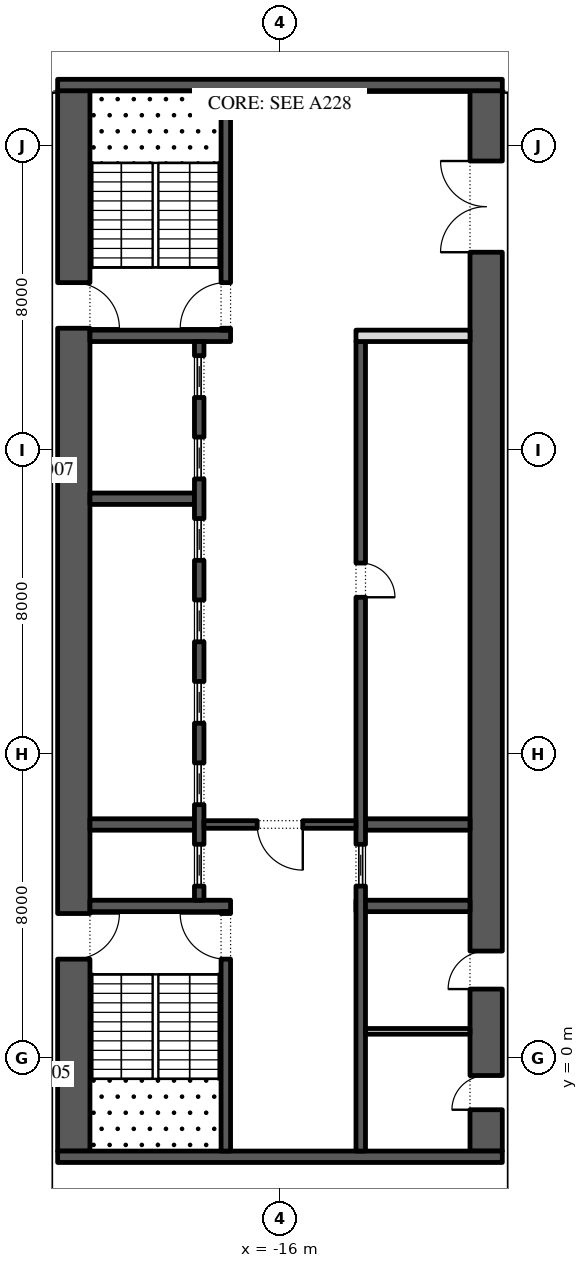
"""IFC4 building model, lengths in metres.
Left out: names, types, materials, properties, quantities, classifications, styles, units other than length and angle.
Written with IfcOpenShell. Run it as: python <this file> out.ifc"""

import sys

from ifc_helpers import new_model, si_unit, direction, frame, frame_2d, origin, place, context, subcontext, project, spatial, rectangle, extrude, element, fill, save


model = new_model("IFC4")
c1 = context("Model", 3, precision=1e-05, world=origin(), true_north=direction((0.0, 1.0)))
c2 = subcontext(c1, "Body", "Model", "MODEL_VIEW")
j1 = project(units=[si_unit("LENGTHUNIT", "METRE"), si_unit("PLANEANGLEUNIT", "RADIAN")], contexts=[c1])
p1 = place(None, origin())
s1 = spatial("IfcSite", under=j1, at=p1, CompositionType="ELEMENT")
p2 = place(p1, origin())
s2 = spatial("IfcBuilding", under=s1, at=p2, CompositionType="ELEMENT")
p3 = place(p2, frame((0.0, 0.0, 118.2)))
s3 = spatial("IfcBuildingStorey", under=s2, at=p3, CompositionType="ELEMENT", Elevation=118.2)
p4 = place(p3, frame((-21.425, -2.45, 0.0), z_axis=(0.0, 0.0, 1.0), x_axis=(0.0, 1.0, 0.0)))
e1 = element("IfcWall", 1, at=p4, inside=s3, PredefinedType="SHEAR", context=c2, shape_type="SweptSolid", body=[
    extrude(rectangle(XDim=27.9, YDim=0.85, at=frame_2d((13.95, 0.0))), origin(), (0.0, 0.0, 1.0), 4.0),
])
p5 = place(p4, frame((5.05, 0.0, 0.0)))
e2 = element("IfcOpeningElement", 2, at=p5, cuts=e1, PredefinedType="OPENING", context=c2, shape_type="SweptSolid", body=[
    extrude(rectangle(XDim=1.2, YDim=2.1, at=frame_2d((0.6, 1.05))), frame((0.0, 0.435, 0.0), z_axis=(0.0, -1.0, 0.0), x_axis=(1.0, 0.0, 0.0)), (0.0, 0.0, 1.0), 0.87),
])
p6 = place(p4, frame((21.65, 0.0, 0.0)))
e3 = element("IfcOpeningElement", 3, at=p6, cuts=e1, PredefinedType="OPENING", context=c2, shape_type="SweptSolid", body=[
    extrude(rectangle(XDim=1.2, YDim=2.1, at=frame_2d((0.6, 1.05))), frame((0.0, 0.435, 0.0), z_axis=(0.0, -1.0, 0.0), x_axis=(1.0, 0.0, 0.0)), (0.0, 0.0, 1.0), 0.87),
])
p7 = place(p3, frame((-10.575, -2.45, 0.0), z_axis=(0.0, 0.0, 1.0), x_axis=(0.0, 1.0, 0.0)))
e4 = element("IfcWall", 4, at=p7, inside=s3, PredefinedType="SHEAR", context=c2, shape_type="SweptSolid", body=[
    extrude(rectangle(XDim=27.9, YDim=0.85, at=frame_2d((13.95, 0.0))), origin(), (0.0, 0.0, 1.0), 4.0),
])
p8 = place(p7, frame((23.65, 0.0, 0.0)))
e5 = element("IfcOpeningElement", 5, at=p8, cuts=e4, PredefinedType="OPENING", context=c2, shape_type="SweptSolid", body=[
    extrude(rectangle(XDim=2.4, YDim=2.1, at=frame_2d((1.2, 1.05))), frame((0.0, 0.435, 0.0), z_axis=(0.0, -1.0, 0.0), x_axis=(1.0, 0.0, 0.0)), (0.0, 0.0, 1.0), 0.87),
])
p9 = place(p7, frame((1.087, 0.0, 0.0)))
e6 = element("IfcOpeningElement", 6, at=p9, cuts=e4, PredefinedType="OPENING", context=c2, shape_type="SweptSolid", body=[
    extrude(rectangle(XDim=0.9, YDim=2.1, at=frame_2d((0.45, 1.05))), frame((0.0, 0.435, 0.0), z_axis=(0.0, -1.0, 0.0), x_axis=(1.0, 0.0, 0.0)), (0.0, 0.0, 1.0), 0.87),
])
p10 = place(p7, frame((4.262, 0.0, 0.0)))
e7 = element("IfcOpeningElement", 7, at=p10, cuts=e4, PredefinedType="OPENING", context=c2, shape_type="SweptSolid", body=[
    extrude(rectangle(XDim=1.0, YDim=2.1, at=frame_2d((0.5, 1.05))), frame((0.0, 0.435, 0.0), z_axis=(0.0, -1.0, 0.0), x_axis=(1.0, 0.0, 0.0)), (0.0, 0.0, 1.0), 0.87),
])
for number, where, z_axis, x_axis in (
    (8, (-21.85, -2.6, 0.0), (0.0, 0.0, 1.0), (1.0, 0.0, 0.0)),
    (9, (-21.85, 25.6, 0.0), (0.0, 0.0, 1.0), (1.0, 0.0, 0.0)),
):
    element("IfcWall", number, at=place(p3, frame(where, z_axis=z_axis, x_axis=x_axis)), inside=s3, PredefinedType="SHEAR", context=c2, shape_type="SweptSolid", body=[
        extrude(rectangle(XDim=11.7, YDim=0.3, at=frame_2d((5.85, 0.0))), origin(), (0.0, 0.0, 1.0), 4.0),
    ])
p11 = place(p3, frame((-21.0, 4.0, 0.0), z_axis=(0.0, 0.0, 1.0), x_axis=(1.0, 0.0, 0.0)))
e10 = element("IfcWall", 10, at=p11, inside=s3, PredefinedType="SHEAR", context=c2, shape_type="SweptSolid", body=[
    extrude(rectangle(XDim=3.7, YDim=0.3, at=frame_2d((1.85, 0.0))), origin(), (0.0, 0.0, 1.0), 4.0),
])
p12 = place(p3, frame((-17.425, -2.45, 0.0), z_axis=(0.0, 0.0, 1.0), x_axis=(0.0, 1.0, 0.0)))
e11 = element("IfcWall", 11, at=p12, inside=s3, PredefinedType="SHEAR", context=c2, shape_type="SweptSolid", body=[
    extrude(rectangle(XDim=6.3, YDim=0.25, at=frame_2d((3.15, 0.0))), origin(), (0.0, 0.0, 1.0), 4.0),
])
p13 = place(p12, frame((5.05, 0.0, 0.0)))
e12 = element("IfcOpeningElement", 12, at=p13, cuts=e11, PredefinedType="OPENING", context=c2, shape_type="SweptSolid", body=[
    extrude(rectangle(XDim=1.2, YDim=2.1, at=frame_2d((0.6, 1.05))), frame((0.0, 0.135, 0.0), z_axis=(0.0, -1.0, 0.0), x_axis=(1.0, 0.0, 0.0)), (0.0, 0.0, 1.0), 0.27),
])
p14 = place(p3, frame((-21.0, 19.0, 0.0), z_axis=(0.0, 0.0, 1.0), x_axis=(1.0, 0.0, 0.0)))
e13 = element("IfcWall", 13, at=p14, inside=s3, PredefinedType="SHEAR", context=c2, shape_type="SweptSolid", body=[
    extrude(rectangle(XDim=3.7, YDim=0.3, at=frame_2d((1.85, 0.0))), origin(), (0.0, 0.0, 1.0), 4.0),
])
p15 = place(p3, frame((-17.425, 19.15, 0.0), z_axis=(0.0, 0.0, 1.0), x_axis=(0.0, 1.0, 0.0)))
e14 = element("IfcWall", 14, at=p15, inside=s3, PredefinedType="SHEAR", context=c2, shape_type="SweptSolid", body=[
    extrude(rectangle(XDim=6.3, YDim=0.25, at=frame_2d((3.15, 0.0))), origin(), (0.0, 0.0, 1.0), 4.0),
])
p16 = place(p15, frame((0.05, 0.0, 0.0)))
e15 = element("IfcOpeningElement", 15, at=p16, cuts=e14, PredefinedType="OPENING", context=c2, shape_type="SweptSolid", body=[
    extrude(rectangle(XDim=1.2, YDim=2.1, at=frame_2d((0.6, 1.05))), frame((0.0, 0.135, 0.0), z_axis=(0.0, -1.0, 0.0), x_axis=(1.0, 0.0, 0.0)), (0.0, 0.0, 1.0), 0.27),
])
for number, where, z_axis, x_axis in (
    (16, (-21.0, 6.143, 0.0), (0.0, 0.0, 1.0), (1.0, 0.0, 0.0)),
    (17, (-21.0, 14.714, 0.0), (0.0, 0.0, 1.0), (1.0, 0.0, 0.0)),
):
    element("IfcWall", number, at=place(p3, frame(where, z_axis=z_axis, x_axis=x_axis)), inside=s3, PredefinedType="SHEAR", context=c2, shape_type="SweptSolid", body=[
        extrude(rectangle(XDim=2.75, YDim=0.3, at=frame_2d((1.375, 0.0))), origin(), (0.0, 0.0, 1.0), 4.0),
    ])
p17 = place(p3, frame((-18.125, 4.15, 0.0), z_axis=(0.0, 0.0, 1.0), x_axis=(0.0, 1.0, 0.0)))
e18 = element("IfcWall", 18, at=p17, inside=s3, PredefinedType="SHEAR", context=c2, shape_type="SweptSolid", body=[
    extrude(rectangle(XDim=14.7, YDim=0.25, at=frame_2d((7.35, 0.0))), origin(), (0.0, 0.0, 1.0), 4.0),
])
p18 = place(p17, frame((0.371, 0.0, 0.0)))
e19 = element("IfcOpeningElement", 19, at=p18, cuts=e18, PredefinedType="OPENING", context=c2, shape_type="SweptSolid", body=[
    extrude(rectangle(XDim=1.1, YDim=2.1, at=frame_2d((0.55, 1.05))), frame((0.0, 0.135, 0.0), z_axis=(0.0, -1.0, 0.0), x_axis=(1.0, 0.0, 0.0)), (0.0, 0.0, 1.0), 0.27),
])
p19 = place(p17, frame((2.514, 0.0, 0.0)))
e20 = element("IfcOpeningElement", 20, at=p19, cuts=e18, PredefinedType="OPENING", context=c2, shape_type="SweptSolid", body=[
    extrude(rectangle(XDim=1.1, YDim=2.1, at=frame_2d((0.55, 1.05))), frame((0.0, 0.135, 0.0), z_axis=(0.0, -1.0, 0.0), x_axis=(1.0, 0.0, 0.0)), (0.0, 0.0, 1.0), 0.27),
])
p20 = place(p17, frame((4.657, 0.0, 0.0)))
e21 = element("IfcOpeningElement", 21, at=p20, cuts=e18, PredefinedType="OPENING", context=c2, shape_type="SweptSolid", body=[
    extrude(rectangle(XDim=1.1, YDim=2.1, at=frame_2d((0.55, 1.05))), frame((0.0, 0.135, 0.0), z_axis=(0.0, -1.0, 0.0), x_axis=(1.0, 0.0, 0.0)), (0.0, 0.0, 1.0), 0.27),
])
p21 = place(p17, frame((6.8, 0.0, 0.0)))
e22 = element("IfcOpeningElement", 22, at=p21, cuts=e18, PredefinedType="OPENING", context=c2, shape_type="SweptSolid", body=[
    extrude(rectangle(XDim=1.1, YDim=2.1, at=frame_2d((0.55, 1.05))), frame((0.0, 0.135, 0.0), z_axis=(0.0, -1.0, 0.0), x_axis=(1.0, 0.0, 0.0)), (0.0, 0.0, 1.0), 0.27),
])
p22 = place(p17, frame((8.943, 0.0, 0.0)))
e23 = element("IfcOpeningElement", 23, at=p22, cuts=e18, PredefinedType="OPENING", context=c2, shape_type="SweptSolid", body=[
    extrude(rectangle(XDim=1.1, YDim=2.1, at=frame_2d((0.55, 1.05))), frame((0.0, 0.135, 0.0), z_axis=(0.0, -1.0, 0.0), x_axis=(1.0, 0.0, 0.0)), (0.0, 0.0, 1.0), 0.27),
])
p23 = place(p17, frame((11.086, 0.0, 0.0)))
e24 = element("IfcOpeningElement", 24, at=p23, cuts=e18, PredefinedType="OPENING", context=c2, shape_type="SweptSolid", body=[
    extrude(rectangle(XDim=1.1, YDim=2.1, at=frame_2d((0.55, 1.05))), frame((0.0, 0.135, 0.0), z_axis=(0.0, -1.0, 0.0), x_axis=(1.0, 0.0, 0.0)), (0.0, 0.0, 1.0), 0.27),
])
p24 = place(p17, frame((13.229, 0.0, 0.0)))
e25 = element("IfcOpeningElement", 25, at=p24, cuts=e18, PredefinedType="OPENING", context=c2, shape_type="SweptSolid", body=[
    extrude(rectangle(XDim=1.1, YDim=2.1, at=frame_2d((0.55, 1.05))), frame((0.0, 0.135, 0.0), z_axis=(0.0, -1.0, 0.0), x_axis=(1.0, 0.0, 0.0)), (0.0, 0.0, 1.0), 0.27),
])
p25 = place(p3, frame((-14.0, 4.0, 0.0), z_axis=(0.0, 0.0, 1.0), x_axis=(1.0, 0.0, 0.0)))
e26 = element("IfcWall", 26, at=p25, inside=s3, PredefinedType="SHEAR", context=c2, shape_type="SweptSolid", body=[
    extrude(rectangle(XDim=3.0, YDim=0.3, at=frame_2d((1.5, 0.0))), origin(), (0.0, 0.0, 1.0), 4.0),
])
p26 = place(p3, frame((-13.75, 6.143, 0.0), z_axis=(0.0, 0.0, 1.0), x_axis=(1.0, 0.0, 0.0)))
e27 = element("IfcWall", 27, at=p26, inside=s3, PredefinedType="SHEAR", context=c2, shape_type="SweptSolid", body=[
    extrude(rectangle(XDim=2.75, YDim=0.3, at=frame_2d((1.375, 0.0))), origin(), (0.0, 0.0, 1.0), 4.0),
])
p27 = place(p3, frame((-13.875, -2.45, 0.0), z_axis=(0.0, 0.0, 1.0), x_axis=(0.0, 1.0, 0.0)))
e28 = element("IfcWall", 28, at=p27, inside=s3, PredefinedType="SHEAR", context=c2, shape_type="SweptSolid", body=[
    extrude(rectangle(XDim=21.3, YDim=0.25, at=frame_2d((10.65, 0.0))), origin(), (0.0, 0.0, 1.0), 4.0),
])
p28 = place(p27, frame((14.571, 0.0, 0.0)))
e29 = element("IfcOpeningElement", 29, at=p28, cuts=e28, PredefinedType="OPENING", context=c2, shape_type="SweptSolid", body=[
    extrude(rectangle(XDim=0.9, YDim=2.1, at=frame_2d((0.45, 1.05))), frame((0.0, 0.135, 0.0), z_axis=(0.0, -1.0, 0.0), x_axis=(1.0, 0.0, 0.0)), (0.0, 0.0, 1.0), 0.27),
])
p29 = place(p27, frame((6.971, 0.0, 0.0)))
e30 = element("IfcOpeningElement", 30, at=p29, cuts=e28, PredefinedType="OPENING", context=c2, shape_type="SweptSolid", body=[
    extrude(rectangle(XDim=1.1, YDim=2.1, at=frame_2d((0.55, 1.05))), frame((0.0, 0.135, 0.0), z_axis=(0.0, -1.0, 0.0), x_axis=(1.0, 0.0, 0.0)), (0.0, 0.0, 1.0), 0.27),
])
p30 = place(p3, frame((-14.0, 19.0, 0.0), z_axis=(0.0, 0.0, 1.0), x_axis=(1.0, 0.0, 0.0)))
e31 = element("IfcWall", 31, at=p30, inside=s3, PredefinedType="PARTITIONING", context=c2, shape_type="SweptSolid", body=[
    extrude(rectangle(XDim=3.0, YDim=0.3, at=frame_2d((1.5, 0.0))), origin(), (0.0, 0.0, 1.0), 4.0),
])
p31 = place(p3, frame((-18.0, 6.143, 0.0), z_axis=(0.0, 0.0, 1.0), x_axis=(1.0, 0.0, 0.0)))
e32 = element("IfcWall", 32, at=p31, inside=s3, PredefinedType="SHEAR", context=c2, shape_type="SweptSolid", body=[
    extrude(rectangle(XDim=4.0, YDim=0.2, at=frame_2d((2.0, 0.0))), origin(), (0.0, 0.0, 1.0), 4.0),
])
p32 = place(p31, frame((1.4, 0.0, 0.0)))
e33 = element("IfcOpeningElement", 33, at=p32, cuts=e32, PredefinedType="OPENING", context=c2, shape_type="SweptSolid", body=[
    extrude(rectangle(XDim=1.2, YDim=2.1, at=frame_2d((0.6, 1.05))), frame((0.0, 0.11, 0.0), z_axis=(0.0, -1.0, 0.0), x_axis=(1.0, 0.0, 0.0)), (0.0, 0.0, 1.0), 0.22),
])
p33 = place(p3, frame((-13.75, 0.7, 0.0), z_axis=(0.0, 0.0, 1.0), x_axis=(1.0, 0.0, 0.0)))
e34 = element("IfcWall", 34, at=p33, inside=s3, PredefinedType="PARTITIONING", context=c2, shape_type="SweptSolid", body=[
    extrude(rectangle(XDim=2.75, YDim=0.15, at=frame_2d((1.375, 0.0))), origin(), (0.0, 0.0, 1.0), 4.0),
])
p34 = place(p18, origin())
e35 = element("IfcDoor", 35, at=p34, inside=s3, OperationType="SLIDING_TO_LEFT", PredefinedType="DOOR", context=c2, shape_type="SweptSolid", body=[
    extrude(rectangle(XDim=1.1, YDim=2.1, at=frame_2d((0.55, 1.05))), frame((0.0, 0.025, 0.0), z_axis=(0.0, -1.0, 0.0), x_axis=(1.0, 0.0, 0.0)), (0.0, 0.0, 1.0), 0.05),
])
fill(e19, e35)
p35 = place(p19, origin())
e36 = element("IfcDoor", 36, at=p35, inside=s3, OperationType="SLIDING_TO_LEFT", PredefinedType="DOOR", context=c2, shape_type="SweptSolid", body=[
    extrude(rectangle(XDim=1.1, YDim=2.1, at=frame_2d((0.55, 1.05))), frame((0.0, 0.025, 0.0), z_axis=(0.0, -1.0, 0.0), x_axis=(1.0, 0.0, 0.0)), (0.0, 0.0, 1.0), 0.05),
])
fill(e20, e36)
p36 = place(p20, origin())
e37 = element("IfcDoor", 37, at=p36, inside=s3, OperationType="SLIDING_TO_LEFT", PredefinedType="DOOR", context=c2, shape_type="SweptSolid", body=[
    extrude(rectangle(XDim=1.1, YDim=2.1, at=frame_2d((0.55, 1.05))), frame((0.0, 0.025, 0.0), z_axis=(0.0, -1.0, 0.0), x_axis=(1.0, 0.0, 0.0)), (0.0, 0.0, 1.0), 0.05),
])
fill(e21, e37)
p37 = place(p21, origin())
e38 = element("IfcDoor", 38, at=p37, inside=s3, OperationType="SLIDING_TO_LEFT", PredefinedType="DOOR", context=c2, shape_type="SweptSolid", body=[
    extrude(rectangle(XDim=1.1, YDim=2.1, at=frame_2d((0.55, 1.05))), frame((0.0, 0.025, 0.0), z_axis=(0.0, -1.0, 0.0), x_axis=(1.0, 0.0, 0.0)), (0.0, 0.0, 1.0), 0.05),
])
fill(e22, e38)
p38 = place(p22, origin())
e39 = element("IfcDoor", 39, at=p38, inside=s3, OperationType="SLIDING_TO_LEFT", PredefinedType="DOOR", context=c2, shape_type="SweptSolid", body=[
    extrude(rectangle(XDim=1.1, YDim=2.1, at=frame_2d((0.55, 1.05))), frame((0.0, 0.025, 0.0), z_axis=(0.0, -1.0, 0.0), x_axis=(1.0, 0.0, 0.0)), (0.0, 0.0, 1.0), 0.05),
])
fill(e23, e39)
p39 = place(p23, origin())
e40 = element("IfcDoor", 40, at=p39, inside=s3, OperationType="SLIDING_TO_LEFT", PredefinedType="DOOR", context=c2, shape_type="SweptSolid", body=[
    extrude(rectangle(XDim=1.1, YDim=2.1, at=frame_2d((0.55, 1.05))), frame((0.0, 0.025, 0.0), z_axis=(0.0, -1.0, 0.0), x_axis=(1.0, 0.0, 0.0)), (0.0, 0.0, 1.0), 0.05),
])
fill(e24, e40)
p40 = place(p24, origin())
e41 = element("IfcDoor", 41, at=p40, inside=s3, OperationType="SLIDING_TO_LEFT", PredefinedType="DOOR", context=c2, shape_type="SweptSolid", body=[
    extrude(rectangle(XDim=1.1, YDim=2.1, at=frame_2d((0.55, 1.05))), frame((0.0, 0.025, 0.0), z_axis=(0.0, -1.0, 0.0), x_axis=(1.0, 0.0, 0.0)), (0.0, 0.0, 1.0), 0.05),
])
fill(e25, e41)
p41 = place(p28, frame((0.9, -0.2, 0.0), z_axis=(0.0, 0.0, 1.0), x_axis=(-1.0, 0.0, 0.0)))
e42 = element("IfcDoor", 42, at=p41, inside=s3, OperationType="SINGLE_SWING_LEFT", PredefinedType="DOOR", context=c2, shape_type="SweptSolid", body=[
    extrude(rectangle(XDim=0.9, YDim=2.1, at=frame_2d((0.45, 1.05))), frame((0.0, -0.075, 0.0), z_axis=(0.0, -1.0, 0.0), x_axis=(1.0, 0.0, 0.0)), (0.0, 0.0, 1.0), 0.05),
])
fill(e29, e42)
p42 = place(p29, origin())
e43 = element("IfcDoor", 43, at=p42, inside=s3, OperationType="SLIDING_TO_LEFT", PredefinedType="DOOR", context=c2, shape_type="SweptSolid", body=[
    extrude(rectangle(XDim=1.1, YDim=2.1, at=frame_2d((0.55, 1.05))), frame((0.0, 0.025, 0.0), z_axis=(0.0, -1.0, 0.0), x_axis=(1.0, 0.0, 0.0)), (0.0, 0.0, 1.0), 0.05),
])
fill(e30, e43)
p43 = place(p32, frame((1.2, 0.0, 0.0), z_axis=(0.0, 0.0, 1.0), x_axis=(-1.0, 0.0, 0.0)))
e44 = element("IfcDoor", 44, at=p43, inside=s3, OperationType="SINGLE_SWING_RIGHT", PredefinedType="DOOR", context=c2, shape_type="SweptSolid", body=[
    extrude(rectangle(XDim=1.2, YDim=2.1, at=frame_2d((0.6, 1.05))), frame((0.0, 0.025, 0.0), z_axis=(0.0, -1.0, 0.0), x_axis=(1.0, 0.0, 0.0)), (0.0, 0.0, 1.0), 0.05),
])
fill(e33, e44)
p44 = place(p8, origin())
e45 = element("IfcDoor", 45, at=p44, inside=s3, OperationType="DOUBLE_DOOR_SINGLE_SWING", PredefinedType="DOOR", context=c2, shape_type="SweptSolid", body=[
    extrude(rectangle(XDim=2.4, YDim=2.1, at=frame_2d((1.2, 1.05))), frame((0.0, 0.025, 0.0), z_axis=(0.0, -1.0, 0.0), x_axis=(1.0, 0.0, 0.0)), (0.0, 0.0, 1.0), 0.05),
])
fill(e5, e45)
p45 = place(p13, origin())
e46 = element("IfcDoor", 46, at=p45, inside=s3, OperationType="SINGLE_SWING_LEFT", PredefinedType="DOOR", context=c2, shape_type="SweptSolid", body=[
    extrude(rectangle(XDim=1.2, YDim=2.1, at=frame_2d((0.6, 1.05))), frame((0.0, 0.025, 0.0), z_axis=(0.0, -1.0, 0.0), x_axis=(1.0, 0.0, 0.0)), (0.0, 0.0, 1.0), 0.05),
])
fill(e12, e46)
p46 = place(p5, frame((1.2, 0.0, 0.0), z_axis=(0.0, 0.0, 1.0), x_axis=(-1.0, 0.0, 0.0)))
e47 = element("IfcDoor", 47, at=p46, inside=s3, OperationType="SINGLE_SWING_RIGHT", PredefinedType="DOOR", context=c2, shape_type="SweptSolid", body=[
    extrude(rectangle(XDim=1.2, YDim=2.1, at=frame_2d((0.6, 1.05))), frame((0.0, 0.025, 0.0), z_axis=(0.0, -1.0, 0.0), x_axis=(1.0, 0.0, 0.0)), (0.0, 0.0, 1.0), 0.05),
])
fill(e2, e47)
p47 = place(p16, origin())
e48 = element("IfcDoor", 48, at=p47, inside=s3, OperationType="SINGLE_SWING_RIGHT", PredefinedType="DOOR", context=c2, shape_type="SweptSolid", body=[
    extrude(rectangle(XDim=1.2, YDim=2.1, at=frame_2d((0.6, 1.05))), frame((0.0, 0.025, 0.0), z_axis=(0.0, -1.0, 0.0), x_axis=(1.0, 0.0, 0.0)), (0.0, 0.0, 1.0), 0.05),
])
fill(e15, e48)
p48 = place(p6, frame((1.2, 0.0, 0.0), z_axis=(0.0, 0.0, 1.0), x_axis=(-1.0, 0.0, 0.0)))
e49 = element("IfcDoor", 49, at=p48, inside=s3, OperationType="SINGLE_SWING_LEFT", PredefinedType="DOOR", context=c2, shape_type="SweptSolid", body=[
    extrude(rectangle(XDim=1.2, YDim=2.1, at=frame_2d((0.6, 1.05))), frame((0.0, 0.025, 0.0), z_axis=(0.0, -1.0, 0.0), x_axis=(1.0, 0.0, 0.0)), (0.0, 0.0, 1.0), 0.05),
])
fill(e3, e49)
p49 = place(p9, origin())
e50 = element("IfcDoor", 50, at=p49, inside=s3, OperationType="SINGLE_SWING_RIGHT", PredefinedType="DOOR", context=c2, shape_type="SweptSolid", body=[
    extrude(rectangle(XDim=0.9, YDim=2.1, at=frame_2d((0.45, 1.05))), frame((0.0, 0.425, 0.0), z_axis=(0.0, -1.0, 0.0), x_axis=(1.0, 0.0, 0.0)), (0.0, 0.0, 1.0), 0.05),
])
fill(e6, e50)
p50 = place(p10, origin())
e51 = element("IfcDoor", 51, at=p50, inside=s3, OperationType="SINGLE_SWING_RIGHT", PredefinedType="DOOR", context=c2, shape_type="SweptSolid", body=[
    extrude(rectangle(XDim=1.0, YDim=2.1, at=frame_2d((0.5, 1.05))), frame((0.0, 0.425, 0.0), z_axis=(0.0, -1.0, 0.0), x_axis=(1.0, 0.0, 0.0)), (0.0, 0.0, 1.0), 0.05),
])
fill(e7, e51)
save(model, sys.argv[1])
